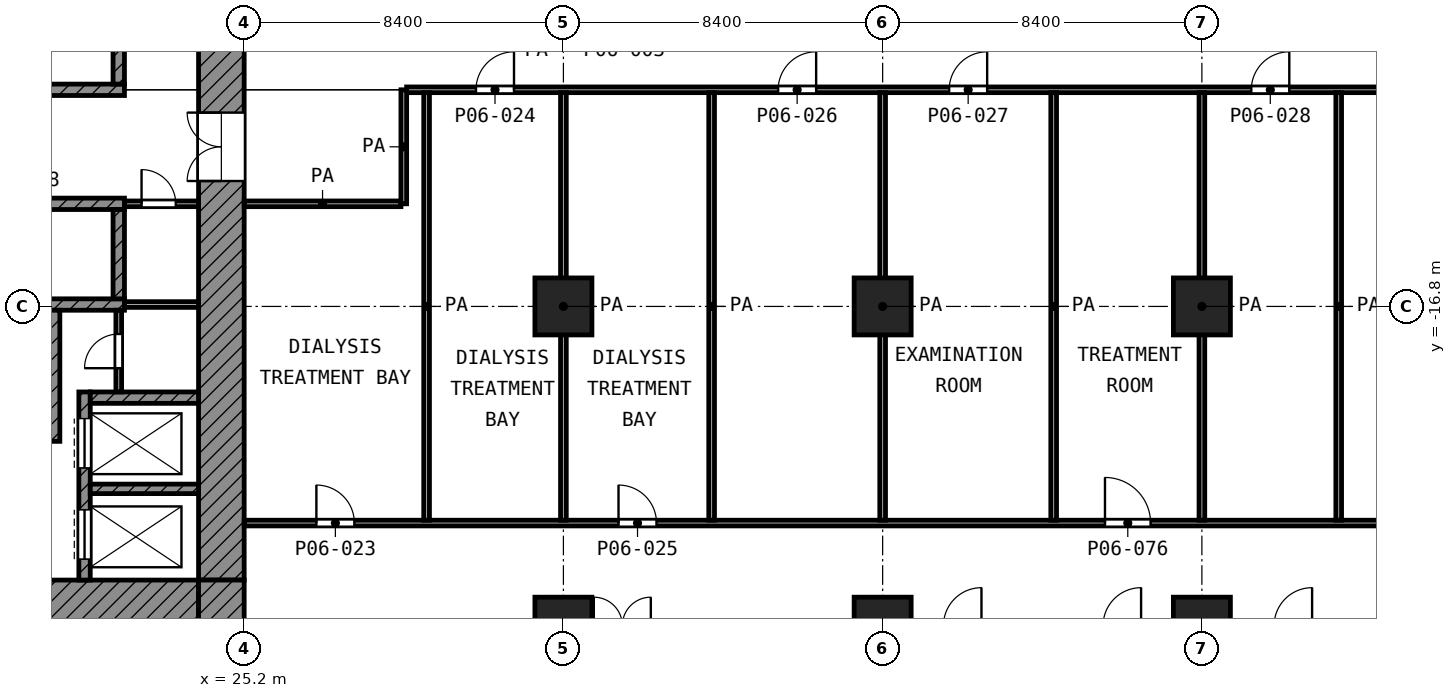
"""IFC4 building model, lengths in metres.
Left out: names, types, materials, properties, quantities, classifications, styles, units other than length and angle.
Written with IfcOpenShell. Run it as: python <this file> out.ifc"""

import sys

from ifc_helpers import new_model, si_unit, direction, frame, frame_2d, origin, origin_2d, place, context, subcontext, project, spatial, rectangle, extrude, element, fill, save


model = new_model("IFC4")
c1 = context("Model", 3, precision=1e-05, world=origin(), true_north=direction((0.0, 1.0)))
c2 = subcontext(c1, "Body", "Model", "MODEL_VIEW")
j1 = project(units=[si_unit("LENGTHUNIT", "METRE"), si_unit("PLANEANGLEUNIT", "RADIAN")], contexts=[c1])
p1 = place(None, origin())
s1 = spatial("IfcSite", under=j1, at=p1, CompositionType="ELEMENT")
p2 = place(p1, origin())
s2 = spatial("IfcBuilding", under=s1, at=p2, CompositionType="ELEMENT")
p3 = place(p2, frame((0.0, 0.0, 29.0)))
s3 = spatial("IfcBuildingStorey", under=s2, at=p3, CompositionType="ELEMENT", Elevation=29.0)
for number, where, z_axis, x_axis in (
    (1, (33.6, -16.8, 0.0), (0.0, 0.0, 1.0), (1.0, 0.0, 0.0)),
    (2, (42.0, -16.8, 0.0), (0.0, 0.0, 1.0), (1.0, 0.0, 0.0)),
    (3, (50.4, -16.8, 0.0), (0.0, 0.0, 1.0), (1.0, 0.0, 0.0)),
    (4, (33.6, -25.2, 0.0), (0.0, 0.0, 1.0), (1.0, 0.0, 0.0)),
    (5, (42.0, -25.2, 0.0), (0.0, 0.0, 1.0), (1.0, 0.0, 0.0)),
    (6, (50.4, -25.2, 0.0), (0.0, 0.0, 1.0), (1.0, 0.0, 0.0)),
):
    element("IfcColumn", number, at=place(p3, frame(where, z_axis=z_axis, x_axis=x_axis)), inside=s3, PredefinedType="COLUMN", context=c2, shape_type="SweptSolid", body=[
        extrude(rectangle(XDim=1.5, YDim=1.5, at=origin_2d()), origin(), (0.0, 0.0, 1.0), 5.2),
    ])
p4 = place(p3, frame((24.6, -24.0, 0.0), z_axis=(0.0, 0.0, 1.0), x_axis=(0.0, 1.0, 0.0)))
e7 = element("IfcWall", 7, at=p4, inside=s3, PredefinedType="SHEAR", context=c2, shape_type="SweptSolid", body=[
    extrude(rectangle(XDim=18.6, YDim=1.2, at=frame_2d((9.3, 0.0))), origin(), (0.0, 0.0, 1.0), 4.7),
])
p5 = place(p4, frame((10.5, 0.0, 0.0)))
e8 = element("IfcOpeningElement", 8, at=p5, cuts=e7, PredefinedType="OPENING", context=c2, shape_type="SweptSolid", body=[
    extrude(rectangle(XDim=1.8, YDim=2.1, at=frame_2d((0.9, 1.05))), frame((0.0, 0.61, 0.0), z_axis=(0.0, -1.0, 0.0), x_axis=(1.0, 0.0, 0.0)), (0.0, 0.0, 1.0), 1.22),
])
p6 = place(p3, frame((5.4, -24.6, 0.0), z_axis=(0.0, 0.0, 1.0), x_axis=(1.0, 0.0, 0.0)))
e9 = element("IfcWall", 9, at=p6, inside=s3, PredefinedType="SHEAR", context=c2, shape_type="SweptSolid", body=[
    extrude(rectangle(XDim=18.6, YDim=1.2, at=frame_2d((9.3, 0.0))), origin(), (0.0, 0.0, 1.0), 4.7),
])
p7 = place(p6, frame((6.3, 0.0, 0.0)))
e10 = element("IfcOpeningElement", 10, at=p7, cuts=e9, PredefinedType="OPENING", context=c2, shape_type="SweptSolid", body=[
    extrude(rectangle(XDim=1.8, YDim=2.1, at=frame_2d((0.9, 1.05))), frame((0.0, 0.61, 0.0), z_axis=(0.0, -1.0, 0.0), x_axis=(1.0, 0.0, 0.0)), (0.0, 0.0, 1.0), 1.22),
])
p8 = place(p3, frame((24.6, -25.2, 0.0), z_axis=(0.0, 0.0, 1.0), x_axis=(0.0, 1.0, 0.0)))
e11 = element("IfcWall", 11, at=p8, inside=s3, PredefinedType="SHEAR", context=c2, shape_type="SweptSolid", body=[
    extrude(rectangle(XDim=1.2, YDim=1.2, at=frame_2d((0.6, 0.0))), origin(), (0.0, 0.0, 1.0), 4.7),
])
p9 = place(p3, frame((5.4, -11.1, 0.0), z_axis=(0.0, 0.0, 1.0), x_axis=(1.0, 0.0, 0.0)))
e12 = element("IfcWall", 12, at=p9, inside=s3, PredefinedType="SHEAR", context=c2, shape_type="SweptSolid", body=[
    extrude(rectangle(XDim=16.65, YDim=0.3, at=frame_2d((8.325, 0.0))), origin(), (0.0, 0.0, 1.0), 4.7),
])
p10 = place(p9, frame((0.825, 0.0, 0.0)))
e13 = element("IfcOpeningElement", 13, at=p10, cuts=e12, PredefinedType="OPENING", context=c2, shape_type="SweptSolid", body=[
    extrude(rectangle(XDim=1.1, YDim=2.1, at=frame_2d((0.55, 1.05))), frame((0.0, 0.16, 0.0), z_axis=(0.0, -1.0, 0.0), x_axis=(1.0, 0.0, 0.0)), (0.0, 0.0, 1.0), 0.32),
])
p11 = place(p9, frame((3.575, 0.0, 0.0)))
e14 = element("IfcOpeningElement", 14, at=p11, cuts=e12, PredefinedType="OPENING", context=c2, shape_type="SweptSolid", body=[
    extrude(rectangle(XDim=1.1, YDim=2.1, at=frame_2d((0.55, 1.05))), frame((0.0, 0.16, 0.0), z_axis=(0.0, -1.0, 0.0), x_axis=(1.0, 0.0, 0.0)), (0.0, 0.0, 1.0), 0.32),
])
p12 = place(p9, frame((6.325, 0.0, 0.0)))
e15 = element("IfcOpeningElement", 15, at=p12, cuts=e12, PredefinedType="OPENING", context=c2, shape_type="SweptSolid", body=[
    extrude(rectangle(XDim=1.1, YDim=2.1, at=frame_2d((0.55, 1.05))), frame((0.0, 0.16, 0.0), z_axis=(0.0, -1.0, 0.0), x_axis=(1.0, 0.0, 0.0)), (0.0, 0.0, 1.0), 0.32),
])
p13 = place(p9, frame((9.075, 0.0, 0.0)))
e16 = element("IfcOpeningElement", 16, at=p13, cuts=e12, PredefinedType="OPENING", context=c2, shape_type="SweptSolid", body=[
    extrude(rectangle(XDim=1.1, YDim=2.1, at=frame_2d((0.55, 1.05))), frame((0.0, 0.16, 0.0), z_axis=(0.0, -1.0, 0.0), x_axis=(1.0, 0.0, 0.0)), (0.0, 0.0, 1.0), 0.32),
])
for number, where, z_axis, x_axis in (
    (17, (5.4, -14.1, 0.0), (0.0, 0.0, 1.0), (1.0, 0.0, 0.0)),
    (18, (5.4, -16.75, 0.0), (0.0, 0.0, 1.0), (1.0, 0.0, 0.0)),
):
    element("IfcWall", number, at=place(p3, frame(where, z_axis=z_axis, x_axis=x_axis)), inside=s3, PredefinedType="SHEAR", context=c2, shape_type="SweptSolid", body=[
        extrude(rectangle(XDim=16.65, YDim=0.3, at=frame_2d((8.325, 0.0))), origin(), (0.0, 0.0, 1.0), 4.7),
    ])
p14 = place(p3, frame((20.2, -20.35, 0.0), z_axis=(0.0, 0.0, 1.0), x_axis=(0.0, 1.0, 0.0)))
e19 = element("IfcWall", 19, at=p14, inside=s3, PredefinedType="SHEAR", context=c2, shape_type="SweptSolid", body=[
    extrude(rectangle(XDim=3.45, YDim=0.3, at=frame_2d((1.725, 0.0))), origin(), (0.0, 0.0, 1.0), 4.7),
])
p15 = place(p3, frame((21.9, -10.95, 0.0), z_axis=(0.0, 0.0, 1.0), x_axis=(0.0, 1.0, 0.0)))
e20 = element("IfcWall", 20, at=p15, inside=s3, PredefinedType="SHEAR", context=c2, shape_type="SweptSolid", body=[
    extrude(rectangle(XDim=2.35, YDim=0.3, at=frame_2d((1.175, 0.0))), origin(), (0.0, 0.0, 1.0), 4.7),
])
p16 = place(p3, frame((21.9, -16.6, 0.0), z_axis=(0.0, 0.0, 1.0), x_axis=(0.0, 1.0, 0.0)))
e21 = element("IfcWall", 21, at=p16, inside=s3, PredefinedType="SHEAR", context=c2, shape_type="SweptSolid", body=[
    extrude(rectangle(XDim=2.35, YDim=0.3, at=frame_2d((1.175, 0.0))), origin(), (0.0, 0.0, 1.0), 4.7),
])
p17 = place(p3, frame((21.15, -19.2, 0.0), z_axis=(0.0, 0.0, 1.0), x_axis=(1.0, 0.0, 0.0)))
e22 = element("IfcWall", 22, at=p17, inside=s3, PredefinedType="SHEAR", context=c2, shape_type="SweptSolid", body=[
    extrude(rectangle(XDim=2.85, YDim=0.3, at=frame_2d((1.425, 0.0))), origin(), (0.0, 0.0, 1.0), 4.7),
])
p18 = place(p3, frame((21.0, -24.0, 0.0), z_axis=(0.0, 0.0, 1.0), x_axis=(0.0, 1.0, 0.0)))
e23 = element("IfcWall", 23, at=p18, inside=s3, PredefinedType="SHEAR", context=c2, shape_type="SweptSolid", body=[
    extrude(rectangle(XDim=4.95, YDim=0.3, at=frame_2d((2.475, 0.0))), origin(), (0.0, 0.0, 1.0), 4.7),
])
p19 = place(p18, frame((2.95, 0.0, 0.0)))
e24 = element("IfcOpeningElement", 24, at=p19, cuts=e23, PredefinedType="OPENING", context=c2, shape_type="SweptSolid", body=[
    extrude(rectangle(XDim=1.3, YDim=2.1, at=frame_2d((0.65, 1.05))), frame((0.0, 0.16, 0.0), z_axis=(0.0, -1.0, 0.0), x_axis=(1.0, 0.0, 0.0)), (0.0, 0.0, 1.0), 0.32),
])
p20 = place(p18, frame((0.55, 0.0, 0.0)))
e25 = element("IfcOpeningElement", 25, at=p20, cuts=e23, PredefinedType="OPENING", context=c2, shape_type="SweptSolid", body=[
    extrude(rectangle(XDim=1.3, YDim=2.1, at=frame_2d((0.65, 1.05))), frame((0.0, 0.16, 0.0), z_axis=(0.0, -1.0, 0.0), x_axis=(1.0, 0.0, 0.0)), (0.0, 0.0, 1.0), 0.32),
])
p21 = place(p3, frame((21.15, -21.6, 0.0), z_axis=(0.0, 0.0, 1.0), x_axis=(1.0, 0.0, 0.0)))
e26 = element("IfcWall", 26, at=p21, inside=s3, PredefinedType="SHEAR", context=c2, shape_type="SweptSolid", body=[
    extrude(rectangle(XDim=2.85, YDim=0.25, at=frame_2d((1.425, 0.0))), origin(), (0.0, 0.0, 1.0), 4.7),
])
p22 = place(p3, frame((21.9, -19.05, 0.0), z_axis=(0.0, 0.0, 1.0), x_axis=(0.0, 1.0, 0.0)))
e27 = element("IfcWall", 27, at=p22, inside=s3, PredefinedType="PARTITIONING", context=c2, shape_type="SweptSolid", body=[
    extrude(rectangle(XDim=2.15, YDim=0.15, at=frame_2d((1.075, 0.0))), origin(), (0.0, 0.0, 1.0), 4.7),
])
p23 = place(p22, frame((0.625, 0.0, 0.0)))
e28 = element("IfcOpeningElement", 28, at=p23, cuts=e27, PredefinedType="OPENING", context=c2, shape_type="SweptSolid", body=[
    extrude(rectangle(XDim=0.9, YDim=2.1, at=frame_2d((0.45, 1.05))), frame((0.0, 0.085, 0.0), z_axis=(0.0, -1.0, 0.0), x_axis=(1.0, 0.0, 0.0)), (0.0, 0.0, 1.0), 0.17),
])
p24 = place(p3, frame((22.05, -16.75, 0.0), z_axis=(0.0, 0.0, 1.0), x_axis=(1.0, 0.0, 0.0)))
e29 = element("IfcWall", 29, at=p24, inside=s3, PredefinedType="PARTITIONING", context=c2, shape_type="SweptSolid", body=[
    extrude(rectangle(XDim=1.95, YDim=0.15, at=frame_2d((0.975, 0.0))), origin(), (0.0, 0.0, 1.0), 4.7),
])
p25 = place(p3, frame((22.05, -14.1, 0.0), z_axis=(0.0, 0.0, 1.0), x_axis=(1.0, 0.0, 0.0)))
e30 = element("IfcWall", 30, at=p25, inside=s3, PredefinedType="PARTITIONING", context=c2, shape_type="SweptSolid", body=[
    extrude(rectangle(XDim=1.95, YDim=0.15, at=frame_2d((0.975, 0.0))), origin(), (0.0, 0.0, 1.0), 4.7),
])
p26 = place(p25, frame((0.45, 0.0, 0.0)))
e31 = element("IfcOpeningElement", 31, at=p26, cuts=e30, PredefinedType="OPENING", context=c2, shape_type="SweptSolid", body=[
    extrude(rectangle(XDim=0.9, YDim=2.1, at=frame_2d((0.45, 1.05))), frame((0.0, 0.085, 0.0), z_axis=(0.0, -1.0, 0.0), x_axis=(1.0, 0.0, 0.0)), (0.0, 0.0, 1.0), 0.17),
])
p27 = place(p3, frame((25.2, -22.5, 0.0), z_axis=(0.0, 0.0, 1.0), x_axis=(1.0, 0.0, 0.0)))
e32 = element("IfcWall", 32, at=p27, inside=s3, PredefinedType="PARTITIONING", context=c2, shape_type="SweptSolid", body=[
    extrude(rectangle(XDim=64.425, YDim=0.15, at=frame_2d((32.212, 0.0))), origin(), (0.0, 0.0, 1.0), 4.7),
])
p28 = place(p27, frame((1.9, 0.0, 0.0)))
e33 = element("IfcOpeningElement", 33, at=p28, cuts=e32, PredefinedType="OPENING", context=c2, shape_type="SweptSolid", body=[
    extrude(rectangle(XDim=1.0, YDim=2.1, at=frame_2d((0.5, 1.05))), frame((0.0, 0.085, 0.0), z_axis=(0.0, -1.0, 0.0), x_axis=(1.0, 0.0, 0.0)), (0.0, 0.0, 1.0), 0.17),
])
p29 = place(p27, frame((9.85, 0.0, 0.0)))
e34 = element("IfcOpeningElement", 34, at=p29, cuts=e32, PredefinedType="OPENING", context=c2, shape_type="SweptSolid", body=[
    extrude(rectangle(XDim=1.0, YDim=2.1, at=frame_2d((0.5, 1.05))), frame((0.0, 0.085, 0.0), z_axis=(0.0, -1.0, 0.0), x_axis=(1.0, 0.0, 0.0)), (0.0, 0.0, 1.0), 0.17),
])
p30 = place(p27, frame((22.65, 0.0, 0.0)))
e35 = element("IfcOpeningElement", 35, at=p30, cuts=e32, PredefinedType="OPENING", context=c2, shape_type="SweptSolid", body=[
    extrude(rectangle(XDim=1.2, YDim=2.1, at=frame_2d((0.6, 1.05))), frame((0.0, 0.085, 0.0), z_axis=(0.0, -1.0, 0.0), x_axis=(1.0, 0.0, 0.0)), (0.0, 0.0, 1.0), 0.17),
])
p31 = place(p27, frame((35.2, 0.0, 0.0)))
e36 = element("IfcOpeningElement", 36, at=p31, cuts=e32, PredefinedType="OPENING", context=c2, shape_type="SweptSolid", body=[
    extrude(rectangle(XDim=1.0, YDim=2.1, at=frame_2d((0.5, 1.05))), frame((0.0, 0.085, 0.0), z_axis=(0.0, -1.0, 0.0), x_axis=(1.0, 0.0, 0.0)), (0.0, 0.0, 1.0), 0.17),
])
p32 = place(p27, frame((48.0, 0.0, 0.0)))
e37 = element("IfcOpeningElement", 37, at=p32, cuts=e32, PredefinedType="OPENING", context=c2, shape_type="SweptSolid", body=[
    extrude(rectangle(XDim=1.2, YDim=2.1, at=frame_2d((0.6, 1.05))), frame((0.0, 0.085, 0.0), z_axis=(0.0, -1.0, 0.0), x_axis=(1.0, 0.0, 0.0)), (0.0, 0.0, 1.0), 0.17),
])
p33 = place(p3, frame((25.2, -14.1, 0.0), z_axis=(0.0, 0.0, 1.0), x_axis=(1.0, 0.0, 0.0)))
e38 = element("IfcWall", 38, at=p33, inside=s3, PredefinedType="PARTITIONING", context=c2, shape_type="SweptSolid", body=[
    extrude(rectangle(XDim=4.125, YDim=0.15, at=frame_2d((2.062, 0.0))), origin(), (0.0, 0.0, 1.0), 4.7),
])
p34 = place(p3, frame((29.475, -11.1, 0.0), z_axis=(0.0, 0.0, 1.0), x_axis=(1.0, 0.0, 0.0)))
e39 = element("IfcWall", 39, at=p34, inside=s3, PredefinedType="PARTITIONING", context=c2, shape_type="SweptSolid", body=[
    extrude(rectangle(XDim=60.15, YDim=0.15, at=frame_2d((30.075, 0.0))), origin(), (0.0, 0.0, 1.0), 4.7),
])
p35 = place(p34, frame((1.825, 0.0, 0.0)))
e40 = element("IfcOpeningElement", 40, at=p35, cuts=e39, PredefinedType="OPENING", context=c2, shape_type="SweptSolid", body=[
    extrude(rectangle(XDim=1.0, YDim=2.1, at=frame_2d((0.5, 1.05))), frame((0.0, 0.085, 0.0), z_axis=(0.0, -1.0, 0.0), x_axis=(1.0, 0.0, 0.0)), (0.0, 0.0, 1.0), 0.17),
])
p36 = place(p34, frame((9.775, 0.0, 0.0)))
e41 = element("IfcOpeningElement", 41, at=p36, cuts=e39, PredefinedType="OPENING", context=c2, shape_type="SweptSolid", body=[
    extrude(rectangle(XDim=1.0, YDim=2.1, at=frame_2d((0.5, 1.05))), frame((0.0, 0.085, 0.0), z_axis=(0.0, -1.0, 0.0), x_axis=(1.0, 0.0, 0.0)), (0.0, 0.0, 1.0), 0.17),
])
p37 = place(p34, frame((14.275, 0.0, 0.0)))
e42 = element("IfcOpeningElement", 42, at=p37, cuts=e39, PredefinedType="OPENING", context=c2, shape_type="SweptSolid", body=[
    extrude(rectangle(XDim=1.0, YDim=2.1, at=frame_2d((0.5, 1.05))), frame((0.0, 0.085, 0.0), z_axis=(0.0, -1.0, 0.0), x_axis=(1.0, 0.0, 0.0)), (0.0, 0.0, 1.0), 0.17),
])
p38 = place(p34, frame((22.225, 0.0, 0.0)))
e43 = element("IfcOpeningElement", 43, at=p38, cuts=e39, PredefinedType="OPENING", context=c2, shape_type="SweptSolid", body=[
    extrude(rectangle(XDim=1.0, YDim=2.1, at=frame_2d((0.5, 1.05))), frame((0.0, 0.085, 0.0), z_axis=(0.0, -1.0, 0.0), x_axis=(1.0, 0.0, 0.0)), (0.0, 0.0, 1.0), 0.17),
])
p39 = place(p34, frame((26.325, 0.0, 0.0)))
e44 = element("IfcOpeningElement", 44, at=p39, cuts=e39, PredefinedType="OPENING", context=c2, shape_type="SweptSolid", body=[
    extrude(rectangle(XDim=1.2, YDim=2.1, at=frame_2d((0.6, 1.05))), frame((0.0, 0.085, 0.0), z_axis=(0.0, -1.0, 0.0), x_axis=(1.0, 0.0, 0.0)), (0.0, 0.0, 1.0), 0.17),
])
p40 = place(p34, frame((35.025, 0.0, 0.0)))
e45 = element("IfcOpeningElement", 45, at=p40, cuts=e39, PredefinedType="OPENING", context=c2, shape_type="SweptSolid", body=[
    extrude(rectangle(XDim=1.2, YDim=2.1, at=frame_2d((0.6, 1.05))), frame((0.0, 0.085, 0.0), z_axis=(0.0, -1.0, 0.0), x_axis=(1.0, 0.0, 0.0)), (0.0, 0.0, 1.0), 0.17),
])
p41 = place(p34, frame((39.625, 0.0, 0.0)))
e46 = element("IfcOpeningElement", 46, at=p41, cuts=e39, PredefinedType="OPENING", context=c2, shape_type="SweptSolid", body=[
    extrude(rectangle(XDim=1.0, YDim=2.1, at=frame_2d((0.5, 1.05))), frame((0.0, 0.085, 0.0), z_axis=(0.0, -1.0, 0.0), x_axis=(1.0, 0.0, 0.0)), (0.0, 0.0, 1.0), 0.17),
])
p42 = place(p34, frame((47.575, 0.0, 0.0)))
e47 = element("IfcOpeningElement", 47, at=p42, cuts=e39, PredefinedType="OPENING", context=c2, shape_type="SweptSolid", body=[
    extrude(rectangle(XDim=1.0, YDim=2.1, at=frame_2d((0.5, 1.05))), frame((0.0, 0.085, 0.0), z_axis=(0.0, -1.0, 0.0), x_axis=(1.0, 0.0, 0.0)), (0.0, 0.0, 1.0), 0.17),
])
p43 = place(p34, frame((51.675, 0.0, 0.0)))
e48 = element("IfcOpeningElement", 48, at=p43, cuts=e39, PredefinedType="OPENING", context=c2, shape_type="SweptSolid", body=[
    extrude(rectangle(XDim=1.2, YDim=2.1, at=frame_2d((0.6, 1.05))), frame((0.0, 0.085, 0.0), z_axis=(0.0, -1.0, 0.0), x_axis=(1.0, 0.0, 0.0)), (0.0, 0.0, 1.0), 0.17),
])
p44 = place(p34, frame((56.875, 0.0, 0.0)))
e49 = element("IfcOpeningElement", 49, at=p44, cuts=e39, PredefinedType="OPENING", context=c2, shape_type="SweptSolid", body=[
    extrude(rectangle(XDim=1.0, YDim=2.1, at=frame_2d((0.5, 1.05))), frame((0.0, 0.085, 0.0), z_axis=(0.0, -1.0, 0.0), x_axis=(1.0, 0.0, 0.0)), (0.0, 0.0, 1.0), 0.17),
])
p45 = place(p3, frame((29.4, -14.1, 0.0), z_axis=(0.0, 0.0, 1.0), x_axis=(0.0, 1.0, 0.0)))
e50 = element("IfcWall", 50, at=p45, inside=s3, PredefinedType="PARTITIONING", context=c2, shape_type="SweptSolid", body=[
    extrude(rectangle(XDim=3.0, YDim=0.15, at=frame_2d((1.5, 0.0))), origin(), (0.0, 0.0, 1.0), 4.7),
])
for number, where, z_axis, x_axis in (
    (51, (30.0, -22.425, 0.0), (0.0, 0.0, 1.0), (0.0, 1.0, 0.0)),
    (52, (33.6, -22.425, 0.0), (0.0, 0.0, 1.0), (0.0, 1.0, 0.0)),
    (53, (37.5, -22.425, 0.0), (0.0, 0.0, 1.0), (0.0, 1.0, 0.0)),
    (54, (42.0, -22.425, 0.0), (0.0, 0.0, 1.0), (0.0, 1.0, 0.0)),
    (55, (46.5, -22.425, 0.0), (0.0, 0.0, 1.0), (0.0, 1.0, 0.0)),
    (56, (50.4, -22.425, 0.0), (0.0, 0.0, 1.0), (0.0, 1.0, 0.0)),
    (57, (54.0, -22.425, 0.0), (0.0, 0.0, 1.0), (0.0, 1.0, 0.0)),
):
    element("IfcWall", number, at=place(p3, frame(where, z_axis=z_axis, x_axis=x_axis)), inside=s3, PredefinedType="PARTITIONING", context=c2, shape_type="SweptSolid", body=[
        extrude(rectangle(XDim=11.25, YDim=0.15, at=frame_2d((5.625, 0.0))), origin(), (0.0, 0.0, 1.0), 4.7),
    ])
p46 = place(p19, origin())
e58 = element("IfcDoor", 58, at=p46, inside=s3, OperationType="DOUBLE_DOOR_SLIDING", PredefinedType="DOOR", context=c2, shape_type="SweptSolid", body=[
    extrude(rectangle(XDim=1.3, YDim=2.1, at=frame_2d((0.65, 1.05))), frame((0.0, 0.025, 0.0), z_axis=(0.0, -1.0, 0.0), x_axis=(1.0, 0.0, 0.0)), (0.0, 0.0, 1.0), 0.05),
])
fill(e24, e58)
p47 = place(p20, origin())
e59 = element("IfcDoor", 59, at=p47, inside=s3, OperationType="DOUBLE_DOOR_SLIDING", PredefinedType="DOOR", context=c2, shape_type="SweptSolid", body=[
    extrude(rectangle(XDim=1.3, YDim=2.1, at=frame_2d((0.65, 1.05))), frame((0.0, 0.025, 0.0), z_axis=(0.0, -1.0, 0.0), x_axis=(1.0, 0.0, 0.0)), (0.0, 0.0, 1.0), 0.05),
])
fill(e25, e59)
p48 = place(p5, origin())
e60 = element("IfcDoor", 60, at=p48, inside=s3, OperationType="DOUBLE_DOOR_SINGLE_SWING", PredefinedType="DOOR", context=c2, shape_type="SweptSolid", body=[
    extrude(rectangle(XDim=1.8, YDim=2.1, at=frame_2d((0.9, 1.05))), frame((0.0, 0.025, 0.0), z_axis=(0.0, -1.0, 0.0), x_axis=(1.0, 0.0, 0.0)), (0.0, 0.0, 1.0), 0.05),
])
fill(e8, e60)
p49 = place(p26, origin())
e61 = element("IfcDoor", 61, at=p49, inside=s3, OperationType="SINGLE_SWING_LEFT", PredefinedType="DOOR", context=c2, shape_type="SweptSolid", body=[
    extrude(rectangle(XDim=0.9, YDim=2.1, at=frame_2d((0.45, 1.05))), frame((0.0, 0.025, 0.0), z_axis=(0.0, -1.0, 0.0), x_axis=(1.0, 0.0, 0.0)), (0.0, 0.0, 1.0), 0.05),
])
fill(e31, e61)
p50 = place(p23, origin())
e62 = element("IfcDoor", 62, at=p50, inside=s3, OperationType="SINGLE_SWING_LEFT", PredefinedType="DOOR", context=c2, shape_type="SweptSolid", body=[
    extrude(rectangle(XDim=0.9, YDim=2.1, at=frame_2d((0.45, 1.05))), frame((0.0, 0.025, 0.0), z_axis=(0.0, -1.0, 0.0), x_axis=(1.0, 0.0, 0.0)), (0.0, 0.0, 1.0), 0.05),
])
fill(e28, e62)
p51 = place(p28, origin())
e63 = element("IfcDoor", 63, at=p51, inside=s3, OperationType="SINGLE_SWING_LEFT", PredefinedType="DOOR", context=c2, shape_type="SweptSolid", body=[
    extrude(rectangle(XDim=1.0, YDim=2.1, at=frame_2d((0.5, 1.05))), frame((0.0, 0.025, 0.0), z_axis=(0.0, -1.0, 0.0), x_axis=(1.0, 0.0, 0.0)), (0.0, 0.0, 1.0), 0.05),
])
fill(e33, e63)
p52 = place(p35, origin())
e64 = element("IfcDoor", 64, at=p52, inside=s3, OperationType="SINGLE_SWING_RIGHT", PredefinedType="DOOR", context=c2, shape_type="SweptSolid", body=[
    extrude(rectangle(XDim=1.0, YDim=2.1, at=frame_2d((0.5, 1.05))), frame((0.0, 0.025, 0.0), z_axis=(0.0, -1.0, 0.0), x_axis=(1.0, 0.0, 0.0)), (0.0, 0.0, 1.0), 0.05),
])
fill(e40, e64)
p53 = place(p29, origin())
e65 = element("IfcDoor", 65, at=p53, inside=s3, OperationType="SINGLE_SWING_LEFT", PredefinedType="DOOR", context=c2, shape_type="SweptSolid", body=[
    extrude(rectangle(XDim=1.0, YDim=2.1, at=frame_2d((0.5, 1.05))), frame((0.0, 0.025, 0.0), z_axis=(0.0, -1.0, 0.0), x_axis=(1.0, 0.0, 0.0)), (0.0, 0.0, 1.0), 0.05),
])
fill(e34, e65)
p54 = place(p36, origin())
e66 = element("IfcDoor", 66, at=p54, inside=s3, OperationType="SINGLE_SWING_RIGHT", PredefinedType="DOOR", context=c2, shape_type="SweptSolid", body=[
    extrude(rectangle(XDim=1.0, YDim=2.1, at=frame_2d((0.5, 1.05))), frame((0.0, 0.025, 0.0), z_axis=(0.0, -1.0, 0.0), x_axis=(1.0, 0.0, 0.0)), (0.0, 0.0, 1.0), 0.05),
])
fill(e41, e66)
p55 = place(p37, origin())
e67 = element("IfcDoor", 67, at=p55, inside=s3, OperationType="SINGLE_SWING_RIGHT", PredefinedType="DOOR", context=c2, shape_type="SweptSolid", body=[
    extrude(rectangle(XDim=1.0, YDim=2.1, at=frame_2d((0.5, 1.05))), frame((0.0, 0.025, 0.0), z_axis=(0.0, -1.0, 0.0), x_axis=(1.0, 0.0, 0.0)), (0.0, 0.0, 1.0), 0.05),
])
fill(e42, e67)
p56 = place(p30, origin())
e68 = element("IfcDoor", 68, at=p56, inside=s3, OperationType="SINGLE_SWING_LEFT", PredefinedType="DOOR", context=c2, shape_type="SweptSolid", body=[
    extrude(rectangle(XDim=1.2, YDim=2.1, at=frame_2d((0.6, 1.05))), frame((0.0, 0.025, 0.0), z_axis=(0.0, -1.0, 0.0), x_axis=(1.0, 0.0, 0.0)), (0.0, 0.0, 1.0), 0.05),
])
fill(e35, e68)
p57 = place(p38, origin())
e69 = element("IfcDoor", 69, at=p57, inside=s3, OperationType="SINGLE_SWING_RIGHT", PredefinedType="DOOR", context=c2, shape_type="SweptSolid", body=[
    extrude(rectangle(XDim=1.0, YDim=2.1, at=frame_2d((0.5, 1.05))), frame((0.0, 0.025, 0.0), z_axis=(0.0, -1.0, 0.0), x_axis=(1.0, 0.0, 0.0)), (0.0, 0.0, 1.0), 0.05),
])
fill(e43, e69)
save(model, sys.argv[1])
